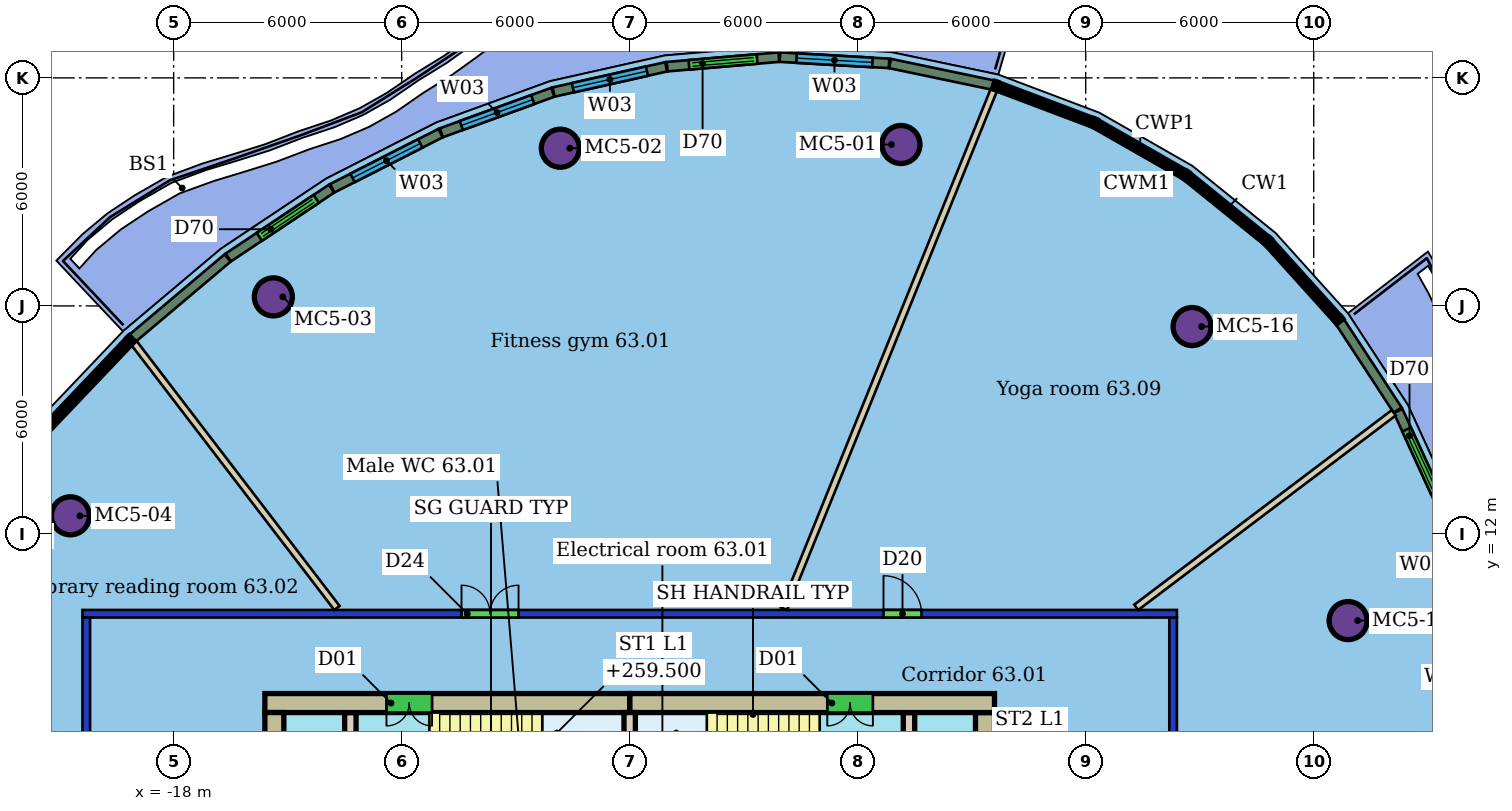
"""IFC4 building model, lengths in metres.
Left out: names, types, materials, properties, quantities, classifications, styles, units other than length and angle.
Written with IfcOpenShell. Run it as: python <this file> out.ifc"""

import sys

from ifc_helpers import new_model, si_unit, direction, frame, frame_2d, origin, origin_2d, place, context, subcontext, project, spatial, rectangle, hollow_circle, extrude, element, fill, save


model = new_model("IFC4")
c1 = context("Model", 3, precision=1e-05, world=origin(), true_north=direction((0.0, 1.0)))
c2 = subcontext(c1, "Body", "Model", "MODEL_VIEW")
j1 = project(units=[si_unit("LENGTHUNIT", "METRE"), si_unit("PLANEANGLEUNIT", "RADIAN")], contexts=[c1])
p1 = place(None, origin())
s1 = spatial("IfcSite", under=j1, at=p1, CompositionType="ELEMENT")
p2 = place(p1, origin())
s2 = spatial("IfcBuilding", under=s1, at=p2, CompositionType="ELEMENT")
p3 = place(p2, frame((0.0, 0.0, 257.7)))
s3 = spatial("IfcBuildingStorey", under=s2, at=p3, CompositionType="ELEMENT", Elevation=257.7)
for number, where, z_axis, x_axis in (
    (1, (1.138, 22.247, 0.0), (0.0, 0.0, 1.0), (1.0, 0.0, 0.0)),
    (2, (-7.825, 22.149, 0.0), (0.0, 0.0, 1.0), (1.0, 0.0, 0.0)),
    (3, (-15.377, 18.238, 0.0), (0.0, 0.0, 1.0), (1.0, 0.0, 0.0)),
    (4, (-20.718, 12.477, 0.0), (0.0, 0.0, 1.0), (1.0, 0.0, 0.0)),
    (5, (12.906, 9.72, 0.0), (0.0, 0.0, 1.0), (1.0, 0.0, 0.0)),
    (6, (8.8, 17.457, 0.0), (0.0, 0.0, 1.0), (1.0, 0.0, 0.0)),
):
    element("IfcColumn", number, at=place(p3, frame(where, z_axis=z_axis, x_axis=x_axis)), inside=s3, PredefinedType="COLUMN", context=c2, shape_type="SweptSolid", body=[
        extrude(hollow_circle(Radius=0.5, WallThickness=0.04, at=origin_2d()), origin(), (0.0, 0.0, 1.0), 3.45),
    ])
p4 = place(p3, frame((-20.3, -9.8, 0.0), z_axis=(0.0, 0.0, 1.0), x_axis=(0.0, 1.0, 0.0)))
e7 = element("IfcWall", 7, at=p4, inside=s3, PredefinedType="PARTITIONING", context=c2, shape_type="SweptSolid", body=[
    extrude(rectangle(XDim=19.6, YDim=0.2, at=frame_2d((9.8, 0.0))), origin(), (0.0, 0.0, 1.0), 3.1),
])
p5 = place(p4, frame((13.85, 0.0, 0.0)))
e8 = element("IfcOpeningElement", 8, at=p5, cuts=e7, PredefinedType="OPENING", context=c2, shape_type="SweptSolid", body=[
    extrude(rectangle(XDim=1.5, YDim=2.1, at=frame_2d((0.75, 1.05))), frame((0.0, 0.11, 0.0), z_axis=(0.0, -1.0, 0.0), x_axis=(1.0, 0.0, 0.0)), (0.0, 0.0, 1.0), 0.22),
])
p6 = place(p4, frame((7.092, 0.0, 0.0)))
e9 = element("IfcOpeningElement", 9, at=p6, cuts=e7, PredefinedType="OPENING", context=c2, shape_type="SweptSolid", body=[
    extrude(rectangle(XDim=1.8, YDim=2.4, at=frame_2d((0.9, 1.2))), frame((0.0, 0.11, 0.0), z_axis=(0.0, -1.0, 0.0), x_axis=(1.0, 0.0, 0.0)), (0.0, 0.0, 1.0), 0.22),
])
p7 = place(p3, frame((-20.4, 9.9, 0.0), z_axis=(0.0, 0.0, 1.0), x_axis=(1.0, 0.0, 0.0)))
e10 = element("IfcWall", 10, at=p7, inside=s3, PredefinedType="PARTITIONING", context=c2, shape_type="SweptSolid", body=[
    extrude(rectangle(XDim=28.8, YDim=0.2, at=frame_2d((14.4, 0.0))), origin(), (0.0, 0.0, 1.0), 3.1),
])
p8 = place(p7, frame((9.976, 0.0, 0.0)))
e11 = element("IfcOpeningElement", 11, at=p8, cuts=e10, PredefinedType="OPENING", context=c2, shape_type="SweptSolid", body=[
    extrude(rectangle(XDim=1.5, YDim=2.1, at=frame_2d((0.75, 1.05))), frame((0.0, 0.11, 0.0), z_axis=(0.0, -1.0, 0.0), x_axis=(1.0, 0.0, 0.0)), (0.0, 0.0, 1.0), 0.22),
])
p9 = place(p7, frame((21.079, 0.0, 0.0)))
e12 = element("IfcOpeningElement", 12, at=p9, cuts=e10, PredefinedType="OPENING", context=c2, shape_type="SweptSolid", body=[
    extrude(rectangle(XDim=1.0, YDim=2.1, at=frame_2d((0.5, 1.05))), frame((0.0, 0.11, 0.0), z_axis=(0.0, -1.0, 0.0), x_axis=(1.0, 0.0, 0.0)), (0.0, 0.0, 1.0), 0.22),
])
p10 = place(p3, frame((8.3, 9.8, 0.0), z_axis=(0.0, 0.0, 1.0), x_axis=(0.0, -1.0, 0.0)))
e13 = element("IfcWall", 13, at=p10, inside=s3, PredefinedType="PARTITIONING", context=c2, shape_type="SweptSolid", body=[
    extrude(rectangle(XDim=19.6, YDim=0.2, at=frame_2d((9.8, 0.0))), origin(), (0.0, 0.0, 1.0), 3.1),
])
p11 = place(p10, frame((10.094, 0.0, 0.0)))
e14 = element("IfcOpeningElement", 14, at=p11, cuts=e13, PredefinedType="OPENING", context=c2, shape_type="SweptSolid", body=[
    extrude(rectangle(XDim=1.8, YDim=2.1, at=frame_2d((0.9, 1.05))), frame((0.0, 0.11, 0.0), z_axis=(0.0, -1.0, 0.0), x_axis=(1.0, 0.0, 0.0)), (0.0, 0.0, 1.0), 0.22),
])
p12 = place(p3, frame((3.582, 23.679, 0.0), z_axis=(0.0, 0.0, 1.0), x_axis=(-0.375113366442, -0.926978943837, 0.0)))
e15 = element("IfcWall", 15, at=p12, inside=s3, PredefinedType="PARTITIONING", context=c2, shape_type="SweptSolid", body=[
    extrude(rectangle(XDim=14.721, YDim=0.175, at=frame_2d((7.361, 0.0))), origin(), (0.0, 0.0, 1.0), 3.45),
])
p13 = place(p3, frame((-19.042, 17.022, 0.0), z_axis=(0.0, 0.0, 1.0), x_axis=(0.608204407096, -0.793780447724, 0.0)))
e16 = element("IfcWall", 16, at=p13, inside=s3, PredefinedType="PARTITIONING", context=c2, shape_type="SweptSolid", body=[
    extrude(rectangle(XDim=8.779, YDim=0.175, at=frame_2d((4.389, 0.0))), origin(), (0.0, 0.0, 1.0), 3.45),
])
p14 = place(p3, frame((14.106, 15.188, 0.0), z_axis=(0.0, 0.0, 1.0), x_axis=(-0.797935541072, -0.602742791159, 0.0)))
e17 = element("IfcWall", 17, at=p14, inside=s3, PredefinedType="PARTITIONING", context=c2, shape_type="SweptSolid", body=[
    extrude(rectangle(XDim=8.491, YDim=0.175, at=frame_2d((4.246, 0.0))), origin(), (0.0, 0.0, 1.0), 3.45),
])
p15 = place(p3, frame((3.563, 23.811, 0.0), z_axis=(0.0, 0.0, 1.0), x_axis=(-0.978796787282, 0.20483371111, 0.0)))
e18 = element("IfcWall", 18, at=p15, inside=s3, PredefinedType="SOLIDWALL", context=c2, shape_type="SweptSolid", body=[
    extrude(rectangle(XDim=2.771, YDim=0.25, at=frame_2d((1.386, 0.0))), origin(), (0.0, 0.0, 1.0), 3.15),
])
p16 = place(p3, frame((0.824, 24.382, 0.0), z_axis=(0.0, 0.0, 1.0), x_axis=(-0.998361927318, 0.057214177282, 0.0)))
e19 = element("IfcWall", 19, at=p16, inside=s3, PredefinedType="SOLIDWALL", context=c2, shape_type="SweptSolid", body=[
    extrude(rectangle(XDim=2.876, YDim=0.25, at=frame_2d((1.438, 0.0))), origin(), (0.0, 0.0, 1.0), 3.15),
])
p17 = place(p16, frame((0.438, 0.0, 0.9)))
e20 = element("IfcOpeningElement", 20, at=p17, cuts=e19, PredefinedType="OPENING", context=c2, shape_type="SweptSolid", body=[
    extrude(rectangle(XDim=2.0, YDim=2.1, at=frame_2d((1.0, 1.05))), frame((0.0, 0.135, 0.0), z_axis=(0.0, -1.0, 0.0), x_axis=(1.0, 0.0, 0.0)), (0.0, 0.0, 1.0), 0.27),
])
p18 = place(p3, frame((-2.073, 24.546, 0.0), z_axis=(0.0, 0.0, 1.0), x_axis=(-0.996387742916, -0.084920349541, 0.0)))
e21 = element("IfcWall", 21, at=p18, inside=s3, PredefinedType="SOLIDWALL", context=c2, shape_type="SweptSolid", body=[
    extrude(rectangle(XDim=2.953, YDim=0.25, at=frame_2d((1.476, 0.0))), origin(), (0.0, 0.0, 1.0), 3.15),
])
p19 = place(p18, frame((0.576, 0.0, 0.0)))
e22 = element("IfcOpeningElement", 22, at=p19, cuts=e21, PredefinedType="OPENING", context=c2, shape_type="SweptSolid", body=[
    extrude(rectangle(XDim=1.8, YDim=2.4, at=frame_2d((0.9, 1.2))), frame((0.0, 0.135, 0.0), z_axis=(0.0, -1.0, 0.0), x_axis=(1.0, 0.0, 0.0)), (0.0, 0.0, 1.0), 0.27),
])
p20 = place(p3, frame((-5.039, 24.291, 0.0), z_axis=(0.0, 0.0, 1.0), x_axis=(-0.975828037389, -0.218539793734, 0.0)))
e23 = element("IfcWall", 23, at=p20, inside=s3, PredefinedType="SOLIDWALL", context=c2, shape_type="SweptSolid", body=[
    extrude(rectangle(XDim=3.035, YDim=0.25, at=frame_2d((1.518, 0.0))), origin(), (0.0, 0.0, 1.0), 3.15),
])
p21 = place(p20, frame((0.518, 0.0, 0.9)))
e24 = element("IfcOpeningElement", 24, at=p21, cuts=e23, PredefinedType="OPENING", context=c2, shape_type="SweptSolid", body=[
    extrude(rectangle(XDim=2.0, YDim=2.1, at=frame_2d((1.0, 1.05))), frame((0.0, 0.135, 0.0), z_axis=(0.0, -1.0, 0.0), x_axis=(1.0, 0.0, 0.0)), (0.0, 0.0, 1.0), 0.27),
])
p22 = place(p3, frame((-8.024, 23.621, 0.0), z_axis=(0.0, 0.0, 1.0), x_axis=(-0.93980485135, -0.341711634831, 0.0)))
e25 = element("IfcWall", 25, at=p22, inside=s3, PredefinedType="SOLIDWALL", context=c2, shape_type="SweptSolid", body=[
    extrude(rectangle(XDim=3.119, YDim=0.25, at=frame_2d((1.559, 0.0))), origin(), (0.0, 0.0, 1.0), 3.15),
])
p23 = place(p22, frame((0.559, 0.0, 0.9)))
e26 = element("IfcOpeningElement", 26, at=p23, cuts=e25, PredefinedType="OPENING", context=c2, shape_type="SweptSolid", body=[
    extrude(rectangle(XDim=2.0, YDim=2.1, at=frame_2d((1.0, 1.05))), frame((0.0, 0.135, 0.0), z_axis=(0.0, -1.0, 0.0), x_axis=(1.0, 0.0, 0.0)), (0.0, 0.0, 1.0), 0.27),
])
p24 = place(p3, frame((-10.977, 22.546, 0.0), z_axis=(0.0, 0.0, 1.0), x_axis=(-0.891165922341, -0.453677527389, 0.0)))
e27 = element("IfcWall", 27, at=p24, inside=s3, PredefinedType="SOLIDWALL", context=c2, shape_type="SweptSolid", body=[
    extrude(rectangle(XDim=3.197, YDim=0.25, at=frame_2d((1.599, 0.0))), origin(), (0.0, 0.0, 1.0), 3.15),
])
p25 = place(p24, frame((0.599, 0.0, 0.9)))
e28 = element("IfcOpeningElement", 28, at=p25, cuts=e27, PredefinedType="OPENING", context=c2, shape_type="SweptSolid", body=[
    extrude(rectangle(XDim=2.0, YDim=2.1, at=frame_2d((1.0, 1.05))), frame((0.0, 0.135, 0.0), z_axis=(0.0, -1.0, 0.0), x_axis=(1.0, 0.0, 0.0)), (0.0, 0.0, 1.0), 0.27),
])
p26 = place(p3, frame((-13.845, 21.084, 0.0), z_axis=(0.0, 0.0, 1.0), x_axis=(-0.832199778985, -0.554475903767, 0.0)))
e29 = element("IfcWall", 29, at=p26, inside=s3, PredefinedType="SOLIDWALL", context=c2, shape_type="SweptSolid", body=[
    extrude(rectangle(XDim=3.266, YDim=0.25, at=frame_2d((1.633, 0.0))), origin(), (0.0, 0.0, 1.0), 3.15),
])
p27 = place(p26, frame((0.483, 0.0, 0.0)))
e30 = element("IfcOpeningElement", 30, at=p27, cuts=e29, PredefinedType="OPENING", context=c2, shape_type="SweptSolid", body=[
    extrude(rectangle(XDim=1.8, YDim=2.4, at=frame_2d((0.9, 1.2))), frame((0.0, 0.135, 0.0), z_axis=(0.0, -1.0, 0.0), x_axis=(1.0, 0.0, 0.0)), (0.0, 0.0, 1.0), 0.27),
])
p28 = place(p3, frame((-16.581, 19.26, 0.0), z_axis=(0.0, 0.0, 1.0), x_axis=(-0.764538162014, -0.644578465995, 0.0)))
e31 = element("IfcWall", 31, at=p28, inside=s3, PredefinedType="SOLIDWALL", context=c2, shape_type="SweptSolid", body=[
    extrude(rectangle(XDim=3.277, YDim=0.25, at=frame_2d((1.638, 0.0))), origin(), (0.0, 0.0, 1.0), 3.15),
])
p29 = place(p3, frame((15.42, 12.622, 0.0), z_axis=(0.0, 0.0, 1.0), x_axis=(-0.416844676261, 0.908977731231, 0.0)))
e32 = element("IfcWall", 32, at=p29, inside=s3, PredefinedType="SOLIDWALL", context=c2, shape_type="SweptSolid", body=[
    extrude(rectangle(XDim=2.876, YDim=0.25, at=frame_2d((1.438, 0.0))), origin(), (0.0, 0.0, 1.0), 3.15),
])
p30 = place(p29, frame((0.538, 0.0, 0.0)))
e33 = element("IfcOpeningElement", 33, at=p30, cuts=e32, PredefinedType="OPENING", context=c2, shape_type="SweptSolid", body=[
    extrude(rectangle(XDim=1.8, YDim=2.4, at=frame_2d((0.9, 1.2))), frame((0.0, 0.135, 0.0), z_axis=(0.0, -1.0, 0.0), x_axis=(1.0, 0.0, 0.0)), (0.0, 0.0, 1.0), 0.27),
])
p31 = place(p3, frame((14.208, 15.26, 0.0), z_axis=(0.0, 0.0, 1.0), x_axis=(-0.547256484876, 0.836964957308, 0.0)))
e34 = element("IfcWall", 34, at=p31, inside=s3, PredefinedType="SOLIDWALL", context=c2, shape_type="SweptSolid", body=[
    extrude(rectangle(XDim=2.771, YDim=0.25, at=frame_2d((1.385, 0.0))), origin(), (0.0, 0.0, 1.0), 3.15),
])
p32 = place(p3, frame((3.6, 7.55, 0.0), z_axis=(0.0, 0.0, 1.0), x_axis=(-1.0, 0.0, 0.0)))
e35 = element("IfcWall", 35, at=p32, inside=s3, PredefinedType="SHEAR", context=c2, shape_type="SweptSolid", body=[
    extrude(rectangle(XDim=9.6, YDim=0.5, at=frame_2d((4.8, 0.0))), origin(), (0.0, 0.0, 1.0), 3.3),
])
p33 = place(p32, frame((3.2, 0.0, 0.0)))
e36 = element("IfcOpeningElement", 36, at=p33, cuts=e35, PredefinedType="OPENING", context=c2, shape_type="SweptSolid", body=[
    extrude(rectangle(XDim=1.2, YDim=2.1, at=frame_2d((0.6, 1.05))), frame((0.0, 0.26, 0.0), z_axis=(0.0, -1.0, 0.0), x_axis=(1.0, 0.0, 0.0)), (0.0, 0.0, 1.0), 0.52),
])
p34 = place(p3, frame((-6.0, 7.55, 0.0), z_axis=(0.0, 0.0, 1.0), x_axis=(-1.0, 0.0, 0.0)))
e37 = element("IfcWall", 37, at=p34, inside=s3, PredefinedType="SHEAR", context=c2, shape_type="SweptSolid", body=[
    extrude(rectangle(XDim=9.6, YDim=0.5, at=frame_2d((4.8, 0.0))), origin(), (0.0, 0.0, 1.0), 3.3),
])
p35 = place(p34, frame((5.2, 0.0, 0.0)))
e38 = element("IfcOpeningElement", 38, at=p35, cuts=e37, PredefinedType="OPENING", context=c2, shape_type="SweptSolid", body=[
    extrude(rectangle(XDim=1.2, YDim=2.1, at=frame_2d((0.6, 1.05))), frame((0.0, 0.26, 0.0), z_axis=(0.0, -1.0, 0.0), x_axis=(1.0, 0.0, 0.0)), (0.0, 0.0, 1.0), 0.52),
])
p36 = place(p3, frame((-15.35, 7.3, 0.0), z_axis=(0.0, 0.0, 1.0), x_axis=(0.0, -1.0, 0.0)))
e39 = element("IfcWall", 39, at=p36, inside=s3, PredefinedType="SHEAR", context=c2, shape_type="SweptSolid", body=[
    extrude(rectangle(XDim=14.6, YDim=0.5, at=frame_2d((7.3, 0.0))), origin(), (0.0, 0.0, 1.0), 3.3),
])
p37 = place(p36, frame((10.6, 0.0, 0.0)))
e40 = element("IfcOpeningElement", 40, at=p37, cuts=e39, PredefinedType="OPENING", context=c2, shape_type="SweptSolid", body=[
    extrude(rectangle(XDim=1.2, YDim=2.1, at=frame_2d((0.6, 1.05))), frame((0.0, 0.26, 0.0), z_axis=(0.0, -1.0, 0.0), x_axis=(1.0, 0.0, 0.0)), (0.0, 0.0, 1.0), 0.52),
])
p38 = place(p36, frame((2.8, 0.0, 0.0)))
e41 = element("IfcOpeningElement", 41, at=p38, cuts=e39, PredefinedType="OPENING", context=c2, shape_type="SweptSolid", body=[
    extrude(rectangle(XDim=1.2, YDim=2.1, at=frame_2d((0.6, 1.05))), frame((0.0, 0.26, 0.0), z_axis=(0.0, -1.0, 0.0), x_axis=(1.0, 0.0, 0.0)), (0.0, 0.0, 1.0), 0.52),
])
p39 = place(p3, frame((3.35, -7.3, 0.0), z_axis=(0.0, 0.0, 1.0), x_axis=(0.0, 1.0, 0.0)))
e42 = element("IfcWall", 42, at=p39, inside=s3, PredefinedType="SHEAR", context=c2, shape_type="SweptSolid", body=[
    extrude(rectangle(XDim=14.6, YDim=0.5, at=frame_2d((7.3, 0.0))), origin(), (0.0, 0.0, 1.0), 3.3),
])
p40 = place(p39, frame((2.8, 0.0, 0.0)))
e43 = element("IfcOpeningElement", 43, at=p40, cuts=e42, PredefinedType="OPENING", context=c2, shape_type="SweptSolid", body=[
    extrude(rectangle(XDim=1.2, YDim=2.1, at=frame_2d((0.6, 1.05))), frame((0.0, 0.26, 0.0), z_axis=(0.0, -1.0, 0.0), x_axis=(1.0, 0.0, 0.0)), (0.0, 0.0, 1.0), 0.52),
])
p41 = place(p39, frame((10.6, 0.0, 0.0)))
e44 = element("IfcOpeningElement", 44, at=p41, cuts=e42, PredefinedType="OPENING", context=c2, shape_type="SweptSolid", body=[
    extrude(rectangle(XDim=1.2, YDim=2.1, at=frame_2d((0.6, 1.05))), frame((0.0, 0.26, 0.0), z_axis=(0.0, -1.0, 0.0), x_axis=(1.0, 0.0, 0.0)), (0.0, 0.0, 1.0), 0.52),
])
p42 = place(p3, frame((-13.35, 7.3, 0.0), z_axis=(0.0, 0.0, 1.0), x_axis=(0.0, -1.0, 0.0)))
e45 = element("IfcWall", 45, at=p42, inside=s3, PredefinedType="SHEAR", context=c2, shape_type="SweptSolid", body=[
    extrude(rectangle(XDim=14.6, YDim=0.3, at=frame_2d((7.3, 0.0))), origin(), (0.0, 0.0, 1.0), 3.3),
])
p43 = place(p42, frame((6.55, 0.0, 0.0)))
e46 = element("IfcOpeningElement", 46, at=p43, cuts=e45, PredefinedType="OPENING", context=c2, shape_type="SweptSolid", body=[
    extrude(rectangle(XDim=1.5, YDim=2.1, at=frame_2d((0.75, 1.05))), frame((0.0, 0.16, 0.0), z_axis=(0.0, -1.0, 0.0), x_axis=(1.0, 0.0, 0.0)), (0.0, 0.0, 1.0), 0.32),
])
p44 = place(p3, frame((1.35, -7.3, 0.0), z_axis=(0.0, 0.0, 1.0), x_axis=(0.0, 1.0, 0.0)))
e47 = element("IfcWall", 47, at=p44, inside=s3, PredefinedType="SHEAR", context=c2, shape_type="SweptSolid", body=[
    extrude(rectangle(XDim=14.6, YDim=0.3, at=frame_2d((7.3, 0.0))), origin(), (0.0, 0.0, 1.0), 3.3),
])
p45 = place(p44, frame((1.21, 0.0, 0.0)))
e48 = element("IfcOpeningElement", 48, at=p45, cuts=e47, PredefinedType="OPENING", context=c2, shape_type="SweptSolid", body=[
    extrude(rectangle(XDim=1.0, YDim=2.1, at=frame_2d((0.5, 1.05))), frame((0.0, 0.16, 0.0), z_axis=(0.0, -1.0, 0.0), x_axis=(1.0, 0.0, 0.0)), (0.0, 0.0, 1.0), 0.32),
])
p46 = place(p44, frame((6.55, 0.0, 0.0)))
e49 = element("IfcOpeningElement", 49, at=p46, cuts=e47, PredefinedType="OPENING", context=c2, shape_type="SweptSolid", body=[
    extrude(rectangle(XDim=1.5, YDim=2.1, at=frame_2d((0.75, 1.05))), frame((0.0, 0.16, 0.0), z_axis=(0.0, -1.0, 0.0), x_axis=(1.0, 0.0, 0.0)), (0.0, 0.0, 1.0), 0.32),
])
p47 = place(p3, frame((-6.0, 3.88, 0.0), z_axis=(0.0, 0.0, 1.0), x_axis=(0.0, 1.0, 0.0)))
e50 = element("IfcWall", 50, at=p47, inside=s3, PredefinedType="SHEAR", context=c2, shape_type="SweptSolid", body=[
    extrude(rectangle(XDim=3.42, YDim=0.3, at=frame_2d((1.71, 0.0))), origin(), (0.0, 0.0, 1.0), 3.3),
])
p48 = place(p8, origin())
e51 = element("IfcDoor", 51, at=p48, inside=s3, OperationType="DOUBLE_DOOR_SINGLE_SWING", PredefinedType="DOOR", context=c2, shape_type="SweptSolid", body=[
    extrude(rectangle(XDim=1.5, YDim=2.1, at=frame_2d((0.75, 1.05))), frame((0.0, 0.025, 0.0), z_axis=(0.0, -1.0, 0.0), x_axis=(1.0, 0.0, 0.0)), (0.0, 0.0, 1.0), 0.05),
])
fill(e11, e51)
p49 = place(p9, origin())
e52 = element("IfcDoor", 52, at=p49, inside=s3, OperationType="SINGLE_SWING_LEFT", PredefinedType="DOOR", context=c2, shape_type="SweptSolid", body=[
    extrude(rectangle(XDim=1.0, YDim=2.1, at=frame_2d((0.5, 1.05))), frame((0.0, 0.025, 0.0), z_axis=(0.0, -1.0, 0.0), x_axis=(1.0, 0.0, 0.0)), (0.0, 0.0, 1.0), 0.05),
])
fill(e12, e52)
p50 = place(p17, origin())
e53 = element("IfcWindow", 53, at=p50, inside=s3, PartitioningType="SINGLE_PANEL", PredefinedType="WINDOW", context=c2, shape_type="SweptSolid", body=[
    extrude(rectangle(XDim=2.0, YDim=2.1, at=frame_2d((1.0, 1.05))), frame((0.0, 0.03, 0.0), z_axis=(0.0, -1.0, 0.0), x_axis=(1.0, 0.0, 0.0)), (0.0, 0.0, 1.0), 0.06),
])
fill(e20, e53)
p51 = place(p19, origin())
e54 = element("IfcDoor", 54, at=p51, inside=s3, OperationType="DOUBLE_DOOR_SLIDING", PredefinedType="DOOR", context=c2, shape_type="SweptSolid", body=[
    extrude(rectangle(XDim=1.8, YDim=2.4, at=frame_2d((0.9, 1.2))), frame((0.0, 0.025, 0.0), z_axis=(0.0, -1.0, 0.0), x_axis=(1.0, 0.0, 0.0)), (0.0, 0.0, 1.0), 0.05),
])
fill(e22, e54)
p52 = place(p21, origin())
e55 = element("IfcWindow", 55, at=p52, inside=s3, PartitioningType="SINGLE_PANEL", PredefinedType="WINDOW", context=c2, shape_type="SweptSolid", body=[
    extrude(rectangle(XDim=2.0, YDim=2.1, at=frame_2d((1.0, 1.05))), frame((0.0, 0.03, 0.0), z_axis=(0.0, -1.0, 0.0), x_axis=(1.0, 0.0, 0.0)), (0.0, 0.0, 1.0), 0.06),
])
fill(e24, e55)
p53 = place(p23, origin())
e56 = element("IfcWindow", 56, at=p53, inside=s3, PartitioningType="SINGLE_PANEL", PredefinedType="WINDOW", context=c2, shape_type="SweptSolid", body=[
    extrude(rectangle(XDim=2.0, YDim=2.1, at=frame_2d((1.0, 1.05))), frame((0.0, 0.03, 0.0), z_axis=(0.0, -1.0, 0.0), x_axis=(1.0, 0.0, 0.0)), (0.0, 0.0, 1.0), 0.06),
])
fill(e26, e56)
p54 = place(p25, origin())
e57 = element("IfcWindow", 57, at=p54, inside=s3, PartitioningType="SINGLE_PANEL", PredefinedType="WINDOW", context=c2, shape_type="SweptSolid", body=[
    extrude(rectangle(XDim=2.0, YDim=2.1, at=frame_2d((1.0, 1.05))), frame((0.0, 0.03, 0.0), z_axis=(0.0, -1.0, 0.0), x_axis=(1.0, 0.0, 0.0)), (0.0, 0.0, 1.0), 0.06),
])
fill(e28, e57)
p55 = place(p27, origin())
e58 = element("IfcDoor", 58, at=p55, inside=s3, OperationType="DOUBLE_DOOR_SLIDING", PredefinedType="DOOR", context=c2, shape_type="SweptSolid", body=[
    extrude(rectangle(XDim=1.8, YDim=2.4, at=frame_2d((0.9, 1.2))), frame((0.0, 0.025, 0.0), z_axis=(0.0, -1.0, 0.0), x_axis=(1.0, 0.0, 0.0)), (0.0, 0.0, 1.0), 0.05),
])
fill(e30, e58)
p56 = place(p30, origin())
e59 = element("IfcDoor", 59, at=p56, inside=s3, OperationType="DOUBLE_DOOR_SLIDING", PredefinedType="DOOR", context=c2, shape_type="SweptSolid", body=[
    extrude(rectangle(XDim=1.8, YDim=2.4, at=frame_2d((0.9, 1.2))), frame((0.0, 0.025, 0.0), z_axis=(0.0, -1.0, 0.0), x_axis=(1.0, 0.0, 0.0)), (0.0, 0.0, 1.0), 0.05),
])
fill(e33, e59)
p57 = place(p33, origin())
e60 = element("IfcDoor", 60, at=p57, inside=s3, OperationType="DOUBLE_DOOR_SINGLE_SWING", PredefinedType="NOTDEFINED", context=c2, shape_type="SweptSolid", body=[
    extrude(rectangle(XDim=1.2, YDim=2.1, at=frame_2d((0.6, 1.05))), frame((0.0, 0.025, 0.0), z_axis=(0.0, -1.0, 0.0), x_axis=(1.0, 0.0, 0.0)), (0.0, 0.0, 1.0), 0.05),
])
fill(e36, e60)
p58 = place(p35, origin())
e61 = element("IfcDoor", 61, at=p58, inside=s3, OperationType="DOUBLE_DOOR_SINGLE_SWING", PredefinedType="NOTDEFINED", context=c2, shape_type="SweptSolid", body=[
    extrude(rectangle(XDim=1.2, YDim=2.1, at=frame_2d((0.6, 1.05))), frame((0.0, 0.025, 0.0), z_axis=(0.0, -1.0, 0.0), x_axis=(1.0, 0.0, 0.0)), (0.0, 0.0, 1.0), 0.05),
])
fill(e38, e61)
save(model, sys.argv[1])
